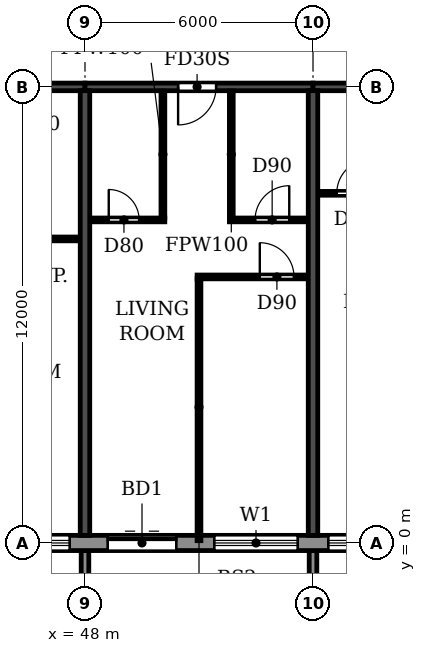
"""IFC4 building model, lengths in metres.
Left out: names, types, materials, properties, quantities, classifications, styles, units other than length and angle.
Written with IfcOpenShell. Run it as: python <this file> out.ifc"""

import sys

from ifc_helpers import new_model, si_unit, direction, frame, frame_2d, origin, place, context, subcontext, project, spatial, polyline, rectangle, outline, extrude, source, transform, mapped, element, fill, save


model = new_model("IFC4")
c1 = context("Model", 3, precision=1e-05, world=origin(), true_north=direction((0.0, 1.0)))
c2 = subcontext(c1, "Body", "Model", "MODEL_VIEW")
j1 = project(units=[si_unit("LENGTHUNIT", "METRE"), si_unit("PLANEANGLEUNIT", "RADIAN")], contexts=[c1])
p1 = place(None, origin())
s1 = spatial("IfcSite", under=j1, at=p1, CompositionType="ELEMENT")
p2 = place(p1, origin())
s2 = spatial("IfcBuilding", under=s1, at=p2, CompositionType="ELEMENT")
p3 = place(p2, frame((0.0, 0.0, 208.2)))
s3 = spatial("IfcBuildingStorey", under=s2, at=p3, CompositionType="ELEMENT", Elevation=208.2)
for number, where, z_axis, x_axis in (
    (1, (48.0, 0.2, 0.0), (0.0, 0.0, 1.0), (0.0, 1.0, 0.0)),
    (2, (54.0, 0.2, 0.0), (0.0, 0.0, 1.0), (0.0, 1.0, 0.0)),
):
    element("IfcWall", number, at=place(p3, frame(where, z_axis=z_axis, x_axis=x_axis)), inside=s3, PredefinedType="SHEAR", context=c2, shape_type="SweptSolid", body=[
        extrude(rectangle(XDim=11.7, YDim=0.25, at=frame_2d((5.85, 0.0))), origin(), (0.0, 0.0, 1.0), 3.0),
    ])
p4 = place(p3, frame((42.0, 12.0, 0.0), z_axis=(0.0, 0.0, 1.0), x_axis=(1.0, 0.0, 0.0)))
e3 = element("IfcWall", 3, at=p4, inside=s3, PredefinedType="SHEAR", context=c2, shape_type="SweptSolid", body=[
    extrude(rectangle(XDim=6.0, YDim=0.2, at=frame_2d((3.0, 0.0))), origin(), (0.0, 0.0, 1.0), 2.4),
])
p5 = place(p4, frame((2.45, 0.0, 0.0)))
e4 = element("IfcOpeningElement", 4, at=p5, cuts=e3, PredefinedType="OPENING", context=c2, shape_type="SweptSolid", body=[
    extrude(rectangle(XDim=1.0, YDim=2.1, at=frame_2d((0.5, 1.05))), frame((0.0, 0.11, 0.0), z_axis=(0.0, -1.0, 0.0), x_axis=(1.0, 0.0, 0.0)), (0.0, 0.0, 1.0), 0.22),
])
p6 = place(p3, frame((48.0, 12.0, 0.0), z_axis=(0.0, 0.0, 1.0), x_axis=(1.0, 0.0, 0.0)))
e5 = element("IfcWall", 5, at=p6, inside=s3, PredefinedType="SHEAR", context=c2, shape_type="SweptSolid", body=[
    extrude(rectangle(XDim=6.0, YDim=0.2, at=frame_2d((3.0, 0.0))), origin(), (0.0, 0.0, 1.0), 2.4),
])
p7 = place(p6, frame((2.45, 0.0, 0.0)))
e6 = element("IfcOpeningElement", 6, at=p7, cuts=e5, PredefinedType="OPENING", context=c2, shape_type="SweptSolid", body=[
    extrude(rectangle(XDim=1.0, YDim=2.1, at=frame_2d((0.5, 1.05))), frame((0.0, 0.11, 0.0), z_axis=(0.0, -1.0, 0.0), x_axis=(1.0, 0.0, 0.0)), (0.0, 0.0, 1.0), 0.22),
])
p8 = place(p3, frame((54.0, 12.0, 0.0), z_axis=(0.0, 0.0, 1.0), x_axis=(1.0, 0.0, 0.0)))
e7 = element("IfcWall", 7, at=p8, inside=s3, PredefinedType="SHEAR", context=c2, shape_type="SweptSolid", body=[
    extrude(rectangle(XDim=6.0, YDim=0.2, at=frame_2d((3.0, 0.0))), origin(), (0.0, 0.0, 1.0), 2.4),
])
p9 = place(p8, frame((2.55, 0.0, 0.0)))
e8 = element("IfcOpeningElement", 8, at=p9, cuts=e7, PredefinedType="OPENING", context=c2, shape_type="SweptSolid", body=[
    extrude(rectangle(XDim=1.0, YDim=2.1, at=frame_2d((0.5, 1.05))), frame((0.0, 0.11, 0.0), z_axis=(0.0, -1.0, 0.0), x_axis=(1.0, 0.0, 0.0)), (0.0, 0.0, 1.0), 0.22),
])
p10 = place(p3, frame((22.683, 0.0, 0.0), z_axis=(0.0, 0.0, 1.0), x_axis=(1.0, 0.0, 0.0)))
e9 = element("IfcWall", 9, at=p10, inside=s3, PredefinedType="STANDARD", context=c2, shape_type="SweptSolid", body=[
    extrude(rectangle(XDim=56.634, YDim=0.4, at=frame_2d((28.317, 0.0))), origin(), (0.0, 0.0, 1.0), 3.0),
])
p11 = place(p10, frame((1.917, 0.0, 0.0)))
e10 = element("IfcOpeningElement", 10, at=p11, cuts=e9, PredefinedType="OPENING", context=c2, shape_type="SweptSolid", body=[
    extrude(rectangle(XDim=1.8, YDim=2.4, at=frame_2d((0.9, 1.2))), frame((0.0, 0.21, 0.0), z_axis=(0.0, -1.0, 0.0), x_axis=(1.0, 0.0, 0.0)), (0.0, 0.0, 1.0), 0.42),
])
p12 = place(p10, frame((4.717, 0.0, 0.9)))
e11 = element("IfcOpeningElement", 11, at=p12, cuts=e9, PredefinedType="OPENING", context=c2, shape_type="SweptSolid", body=[
    extrude(rectangle(XDim=2.2, YDim=1.5, at=frame_2d((1.1, 0.75))), frame((0.0, 0.21, 0.0), z_axis=(0.0, -1.0, 0.0), x_axis=(1.0, 0.0, 0.0)), (0.0, 0.0, 1.0), 0.42),
])
p13 = place(p10, frame((7.717, 0.0, 0.9)))
e12 = element("IfcOpeningElement", 12, at=p13, cuts=e9, PredefinedType="OPENING", context=c2, shape_type="SweptSolid", body=[
    extrude(rectangle(XDim=2.2, YDim=1.5, at=frame_2d((1.1, 0.75))), frame((0.0, 0.21, 0.0), z_axis=(0.0, -1.0, 0.0), x_axis=(1.0, 0.0, 0.0)), (0.0, 0.0, 1.0), 0.42),
])
p14 = place(p10, frame((10.717, 0.0, 0.9)))
e13 = element("IfcOpeningElement", 13, at=p14, cuts=e9, PredefinedType="OPENING", context=c2, shape_type="SweptSolid", body=[
    extrude(rectangle(XDim=2.2, YDim=1.5, at=frame_2d((1.1, 0.75))), frame((0.0, 0.21, 0.0), z_axis=(0.0, -1.0, 0.0), x_axis=(1.0, 0.0, 0.0)), (0.0, 0.0, 1.0), 0.42),
])
p15 = place(p10, frame((13.917, 0.0, 0.0)))
e14 = element("IfcOpeningElement", 14, at=p15, cuts=e9, PredefinedType="OPENING", context=c2, shape_type="SweptSolid", body=[
    extrude(rectangle(XDim=1.8, YDim=2.4, at=frame_2d((0.9, 1.2))), frame((0.0, 0.21, 0.0), z_axis=(0.0, -1.0, 0.0), x_axis=(1.0, 0.0, 0.0)), (0.0, 0.0, 1.0), 0.42),
])
p16 = place(p10, frame((16.717, 0.0, 0.9)))
e15 = element("IfcOpeningElement", 15, at=p16, cuts=e9, PredefinedType="OPENING", context=c2, shape_type="SweptSolid", body=[
    extrude(rectangle(XDim=2.2, YDim=1.5, at=frame_2d((1.1, 0.75))), frame((0.0, 0.21, 0.0), z_axis=(0.0, -1.0, 0.0), x_axis=(1.0, 0.0, 0.0)), (0.0, 0.0, 1.0), 0.42),
])
p17 = place(p10, frame((19.717, 0.0, 0.9)))
e16 = element("IfcOpeningElement", 16, at=p17, cuts=e9, PredefinedType="OPENING", context=c2, shape_type="SweptSolid", body=[
    extrude(rectangle(XDim=2.2, YDim=1.5, at=frame_2d((1.1, 0.75))), frame((0.0, 0.21, 0.0), z_axis=(0.0, -1.0, 0.0), x_axis=(1.0, 0.0, 0.0)), (0.0, 0.0, 1.0), 0.42),
])
p18 = place(p10, frame((22.717, 0.0, 0.9)))
e17 = element("IfcOpeningElement", 17, at=p18, cuts=e9, PredefinedType="OPENING", context=c2, shape_type="SweptSolid", body=[
    extrude(rectangle(XDim=2.2, YDim=1.5, at=frame_2d((1.1, 0.75))), frame((0.0, 0.21, 0.0), z_axis=(0.0, -1.0, 0.0), x_axis=(1.0, 0.0, 0.0)), (0.0, 0.0, 1.0), 0.42),
])
p19 = place(p10, frame((25.917, 0.0, 0.0)))
e18 = element("IfcOpeningElement", 18, at=p19, cuts=e9, PredefinedType="OPENING", context=c2, shape_type="SweptSolid", body=[
    extrude(rectangle(XDim=1.8, YDim=2.4, at=frame_2d((0.9, 1.2))), frame((0.0, 0.21, 0.0), z_axis=(0.0, -1.0, 0.0), x_axis=(1.0, 0.0, 0.0)), (0.0, 0.0, 1.0), 0.42),
])
p20 = place(p10, frame((28.717, 0.0, 0.9)))
e19 = element("IfcOpeningElement", 19, at=p20, cuts=e9, PredefinedType="OPENING", context=c2, shape_type="SweptSolid", body=[
    extrude(rectangle(XDim=2.2, YDim=1.5, at=frame_2d((1.1, 0.75))), frame((0.0, 0.21, 0.0), z_axis=(0.0, -1.0, 0.0), x_axis=(1.0, 0.0, 0.0)), (0.0, 0.0, 1.0), 0.42),
])
p21 = place(p10, frame((31.717, 0.0, 0.9)))
e20 = element("IfcOpeningElement", 20, at=p21, cuts=e9, PredefinedType="OPENING", context=c2, shape_type="SweptSolid", body=[
    extrude(rectangle(XDim=2.2, YDim=1.5, at=frame_2d((1.1, 0.75))), frame((0.0, 0.21, 0.0), z_axis=(0.0, -1.0, 0.0), x_axis=(1.0, 0.0, 0.0)), (0.0, 0.0, 1.0), 0.42),
])
p22 = place(p10, frame((34.717, 0.0, 0.9)))
e21 = element("IfcOpeningElement", 21, at=p22, cuts=e9, PredefinedType="OPENING", context=c2, shape_type="SweptSolid", body=[
    extrude(rectangle(XDim=2.2, YDim=1.5, at=frame_2d((1.1, 0.75))), frame((0.0, 0.21, 0.0), z_axis=(0.0, -1.0, 0.0), x_axis=(1.0, 0.0, 0.0)), (0.0, 0.0, 1.0), 0.42),
])
p23 = place(p10, frame((37.717, 0.0, 0.9)))
e22 = element("IfcOpeningElement", 22, at=p23, cuts=e9, PredefinedType="OPENING", context=c2, shape_type="SweptSolid", body=[
    extrude(rectangle(XDim=2.2, YDim=1.5, at=frame_2d((1.1, 0.75))), frame((0.0, 0.21, 0.0), z_axis=(0.0, -1.0, 0.0), x_axis=(1.0, 0.0, 0.0)), (0.0, 0.0, 1.0), 0.42),
])
p24 = place(p10, frame((40.717, 0.0, 0.9)))
e23 = element("IfcOpeningElement", 23, at=p24, cuts=e9, PredefinedType="OPENING", context=c2, shape_type="SweptSolid", body=[
    extrude(rectangle(XDim=2.2, YDim=1.5, at=frame_2d((1.1, 0.75))), frame((0.0, 0.21, 0.0), z_axis=(0.0, -1.0, 0.0), x_axis=(1.0, 0.0, 0.0)), (0.0, 0.0, 1.0), 0.42),
])
p25 = place(p10, frame((43.717, 0.0, 0.9)))
e24 = element("IfcOpeningElement", 24, at=p25, cuts=e9, PredefinedType="OPENING", context=c2, shape_type="SweptSolid", body=[
    extrude(rectangle(XDim=2.2, YDim=1.5, at=frame_2d((1.1, 0.75))), frame((0.0, 0.21, 0.0), z_axis=(0.0, -1.0, 0.0), x_axis=(1.0, 0.0, 0.0)), (0.0, 0.0, 1.0), 0.42),
])
p26 = place(p10, frame((46.717, 0.0, 0.9)))
e25 = element("IfcOpeningElement", 25, at=p26, cuts=e9, PredefinedType="OPENING", context=c2, shape_type="SweptSolid", body=[
    extrude(rectangle(XDim=2.2, YDim=1.5, at=frame_2d((1.1, 0.75))), frame((0.0, 0.21, 0.0), z_axis=(0.0, -1.0, 0.0), x_axis=(1.0, 0.0, 0.0)), (0.0, 0.0, 1.0), 0.42),
])
p27 = place(p10, frame((49.717, 0.0, 0.9)))
e26 = element("IfcOpeningElement", 26, at=p27, cuts=e9, PredefinedType="OPENING", context=c2, shape_type="SweptSolid", body=[
    extrude(rectangle(XDim=2.2, YDim=1.5, at=frame_2d((1.1, 0.75))), frame((0.0, 0.21, 0.0), z_axis=(0.0, -1.0, 0.0), x_axis=(1.0, 0.0, 0.0)), (0.0, 0.0, 1.0), 0.42),
])
p28 = place(p10, frame((52.917, 0.0, 0.0)))
e27 = element("IfcOpeningElement", 27, at=p28, cuts=e9, PredefinedType="OPENING", context=c2, shape_type="SweptSolid", body=[
    extrude(rectangle(XDim=1.8, YDim=2.4, at=frame_2d((0.9, 1.2))), frame((0.0, 0.21, 0.0), z_axis=(0.0, -1.0, 0.0), x_axis=(1.0, 0.0, 0.0)), (0.0, 0.0, 1.0), 0.42),
])
m1 = source(origin(), c2, "Body", "SweptSolid", [
    extrude(outline(polyline([(0.0, 0.0), (0.2, 0.0), (0.2, 1.65), (0.0, 1.65), (0.0, 0.0)])), origin(), (0.0, 0.0, 1.0), 3.1),
])
for number, where in (
    (28, (47.9, -1.85, 0.0)),
    (29, (53.9, -1.85, 0.0)),
):
    element("IfcWall", number, at=place(p3, frame(where)), inside=s3, PredefinedType="STANDARD", context=c2, shape_type="MappedRepresentation", body=[
        mapped(m1, transform((0.0, 0.0, 0.0))),
    ])
p29 = place(p3, frame((50.95, 7.0, 0.0), z_axis=(0.0, 0.0, 1.0), x_axis=(1.0, 0.0, 0.0)))
e30 = element("IfcWall", 30, at=p29, inside=s3, PredefinedType="PARTITIONING", context=c2, shape_type="SweptSolid", body=[
    extrude(rectangle(XDim=2.915, YDim=0.1, at=frame_2d((1.458, 0.0))), origin(), (0.0, 0.0, 1.0), 3.0),
])
p30 = place(p29, frame((1.65, 0.0, 0.0)))
e31 = element("IfcOpeningElement", 31, at=p30, cuts=e30, PredefinedType="OPENING", context=c2, shape_type="SweptSolid", body=[
    extrude(rectangle(XDim=0.9, YDim=2.1, at=frame_2d((0.45, 1.05))), frame((0.0, 0.06, 0.0), z_axis=(0.0, -1.0, 0.0), x_axis=(1.0, 0.0, 0.0)), (0.0, 0.0, 1.0), 0.12),
])
p31 = place(p3, frame((45.8, 8.0, 0.0), z_axis=(0.0, 0.0, 1.0), x_axis=(1.0, 0.0, 0.0)))
e32 = element("IfcWall", 32, at=p31, inside=s3, PredefinedType="PARTITIONING", context=c2, shape_type="SweptSolid", body=[
    extrude(rectangle(XDim=2.065, YDim=0.1, at=frame_2d((1.032, 0.0))), origin(), (0.0, 0.0, 1.0), 3.0),
])
p32 = place(p3, frame((48.135, 8.5, 0.0), z_axis=(0.0, 0.0, 1.0), x_axis=(1.0, 0.0, 0.0)))
e33 = element("IfcWall", 33, at=p32, inside=s3, PredefinedType="PARTITIONING", context=c2, shape_type="SweptSolid", body=[
    extrude(rectangle(XDim=1.965, YDim=0.1, at=frame_2d((0.982, 0.0))), origin(), (0.0, 0.0, 1.0), 3.0),
])
p33 = place(p32, frame((0.49, 0.0, 0.0)))
e34 = element("IfcOpeningElement", 34, at=p33, cuts=e33, PredefinedType="OPENING", context=c2, shape_type="SweptSolid", body=[
    extrude(rectangle(XDim=0.8, YDim=2.1, at=frame_2d((0.4, 1.05))), frame((0.0, 0.06, 0.0), z_axis=(0.0, -1.0, 0.0), x_axis=(1.0, 0.0, 0.0)), (0.0, 0.0, 1.0), 0.12),
])
p34 = place(p3, frame((51.8, 8.5, 0.0), z_axis=(0.0, 0.0, 1.0), x_axis=(1.0, 0.0, 0.0)))
e35 = element("IfcWall", 35, at=p34, inside=s3, PredefinedType="PARTITIONING", context=c2, shape_type="SweptSolid", body=[
    extrude(rectangle(XDim=2.065, YDim=0.1, at=frame_2d((1.032, 0.0))), origin(), (0.0, 0.0, 1.0), 3.0),
])
p35 = place(p34, frame((0.675, 0.0, 0.0)))
e36 = element("IfcOpeningElement", 36, at=p35, cuts=e35, PredefinedType="OPENING", context=c2, shape_type="SweptSolid", body=[
    extrude(rectangle(XDim=0.9, YDim=2.1, at=frame_2d((0.45, 1.05))), frame((0.0, 0.06, 0.0), z_axis=(0.0, -1.0, 0.0), x_axis=(1.0, 0.0, 0.0)), (0.0, 0.0, 1.0), 0.12),
])
p36 = place(p3, frame((54.135, 9.2, 0.0), z_axis=(0.0, 0.0, 1.0), x_axis=(1.0, 0.0, 0.0)))
e37 = element("IfcWall", 37, at=p36, inside=s3, PredefinedType="PARTITIONING", context=c2, shape_type="SweptSolid", body=[
    extrude(rectangle(XDim=2.065, YDim=0.1, at=frame_2d((1.032, 0.0))), origin(), (0.0, 0.0, 1.0), 3.0),
])
p37 = place(p36, frame((0.49, 0.0, 0.0)))
e38 = element("IfcOpeningElement", 38, at=p37, cuts=e37, PredefinedType="OPENING", context=c2, shape_type="SweptSolid", body=[
    extrude(rectangle(XDim=0.9, YDim=2.1, at=frame_2d((0.45, 1.05))), frame((0.0, 0.06, 0.0), z_axis=(0.0, -1.0, 0.0), x_axis=(1.0, 0.0, 0.0)), (0.0, 0.0, 1.0), 0.12),
])
p38 = place(p3, frame((50.05, 8.55, 0.0), z_axis=(0.0, 0.0, 1.0), x_axis=(0.0, 1.0, 0.0)))
e39 = element("IfcWall", 39, at=p38, inside=s3, PredefinedType="PARTITIONING", context=c2, shape_type="SweptSolid", body=[
    extrude(rectangle(XDim=3.34, YDim=0.1, at=frame_2d((1.67, 0.0))), origin(), (0.0, 0.0, 1.0), 3.0),
])
p39 = place(p3, frame((51.0, 0.06, 0.0), z_axis=(0.0, 0.0, 1.0), x_axis=(0.0, 1.0, 0.0)))
e40 = element("IfcWall", 40, at=p39, inside=s3, PredefinedType="PARTITIONING", context=c2, shape_type="SweptSolid", body=[
    extrude(rectangle(XDim=6.89, YDim=0.1, at=frame_2d((3.445, 0.0))), origin(), (0.0, 0.0, 1.0), 3.0),
])
p40 = place(p3, frame((51.85, 8.55, 0.0), z_axis=(0.0, 0.0, 1.0), x_axis=(0.0, 1.0, 0.0)))
e41 = element("IfcWall", 41, at=p40, inside=s3, PredefinedType="PARTITIONING", context=c2, shape_type="SweptSolid", body=[
    extrude(rectangle(XDim=3.34, YDim=0.1, at=frame_2d((1.67, 0.0))), origin(), (0.0, 0.0, 1.0), 3.0),
])
p41 = place(p18, origin())
e42 = element("IfcWindow", 42, at=p41, inside=s3, PartitioningType="DOUBLE_PANEL_HORIZONTAL", PredefinedType="WINDOW", context=c2, shape_type="SweptSolid", body=[
    extrude(rectangle(XDim=2.2, YDim=1.5, at=frame_2d((1.1, 0.75))), frame((0.0, 0.03, 0.0), z_axis=(0.0, -1.0, 0.0), x_axis=(1.0, 0.0, 0.0)), (0.0, 0.0, 1.0), 0.06),
])
fill(e17, e42)
p42 = place(p19, origin())
e43 = element("IfcDoor", 43, at=p42, inside=s3, OperationType="DOUBLE_DOOR_SLIDING", PredefinedType="DOOR", context=c2, shape_type="SweptSolid", body=[
    extrude(rectangle(XDim=1.8, YDim=2.4, at=frame_2d((0.9, 1.2))), frame((0.0, 0.025, 0.0), z_axis=(0.0, -1.0, 0.0), x_axis=(1.0, 0.0, 0.0)), (0.0, 0.0, 1.0), 0.05),
])
fill(e18, e43)
p43 = place(p20, origin())
e44 = element("IfcWindow", 44, at=p43, inside=s3, PartitioningType="DOUBLE_PANEL_HORIZONTAL", PredefinedType="WINDOW", context=c2, shape_type="SweptSolid", body=[
    extrude(rectangle(XDim=2.2, YDim=1.5, at=frame_2d((1.1, 0.75))), frame((0.0, 0.03, 0.0), z_axis=(0.0, -1.0, 0.0), x_axis=(1.0, 0.0, 0.0)), (0.0, 0.0, 1.0), 0.06),
])
fill(e19, e44)
p44 = place(p21, origin())
e45 = element("IfcWindow", 45, at=p44, inside=s3, PartitioningType="DOUBLE_PANEL_HORIZONTAL", PredefinedType="WINDOW", context=c2, shape_type="SweptSolid", body=[
    extrude(rectangle(XDim=2.2, YDim=1.5, at=frame_2d((1.1, 0.75))), frame((0.0, 0.03, 0.0), z_axis=(0.0, -1.0, 0.0), x_axis=(1.0, 0.0, 0.0)), (0.0, 0.0, 1.0), 0.06),
])
fill(e20, e45)
p45 = place(p33, origin())
e46 = element("IfcDoor", 46, at=p45, inside=s3, OperationType="SINGLE_SWING_LEFT", PredefinedType="DOOR", context=c2, shape_type="SweptSolid", body=[
    extrude(rectangle(XDim=0.8, YDim=2.1, at=frame_2d((0.4, 1.05))), frame((0.0, 0.025, 0.0), z_axis=(0.0, -1.0, 0.0), x_axis=(1.0, 0.0, 0.0)), (0.0, 0.0, 1.0), 0.05),
])
fill(e34, e46)
p46 = place(p7, frame((1.0, 0.0, 0.0), z_axis=(0.0, 0.0, 1.0), x_axis=(-1.0, 0.0, 0.0)))
e47 = element("IfcDoor", 47, at=p46, inside=s3, OperationType="SINGLE_SWING_RIGHT", PredefinedType="DOOR", context=c2, shape_type="SweptSolid", body=[
    extrude(rectangle(XDim=1.0, YDim=2.1, at=frame_2d((0.5, 1.05))), frame((0.0, 0.025, 0.0), z_axis=(0.0, -1.0, 0.0), x_axis=(1.0, 0.0, 0.0)), (0.0, 0.0, 1.0), 0.05),
])
fill(e6, e47)
p47 = place(p35, origin())
e48 = element("IfcDoor", 48, at=p47, inside=s3, OperationType="SINGLE_SWING_RIGHT", PredefinedType="DOOR", context=c2, shape_type="SweptSolid", body=[
    extrude(rectangle(XDim=0.9, YDim=2.1, at=frame_2d((0.45, 1.05))), frame((0.0, 0.025, 0.0), z_axis=(0.0, -1.0, 0.0), x_axis=(1.0, 0.0, 0.0)), (0.0, 0.0, 1.0), 0.05),
])
fill(e36, e48)
p48 = place(p30, origin())
e49 = element("IfcDoor", 49, at=p48, inside=s3, OperationType="SINGLE_SWING_LEFT", PredefinedType="DOOR", context=c2, shape_type="SweptSolid", body=[
    extrude(rectangle(XDim=0.9, YDim=2.1, at=frame_2d((0.45, 1.05))), frame((0.0, 0.025, 0.0), z_axis=(0.0, -1.0, 0.0), x_axis=(1.0, 0.0, 0.0)), (0.0, 0.0, 1.0), 0.05),
])
fill(e31, e49)
p49 = place(p37, origin())
e50 = element("IfcDoor", 50, at=p49, inside=s3, OperationType="SINGLE_SWING_RIGHT", PredefinedType="DOOR", context=c2, shape_type="SweptSolid", body=[
    extrude(rectangle(XDim=0.9, YDim=2.1, at=frame_2d((0.45, 1.05))), frame((0.0, 0.025, 0.0), z_axis=(0.0, -1.0, 0.0), x_axis=(1.0, 0.0, 0.0)), (0.0, 0.0, 1.0), 0.05),
])
fill(e38, e50)
save(model, sys.argv[1])
